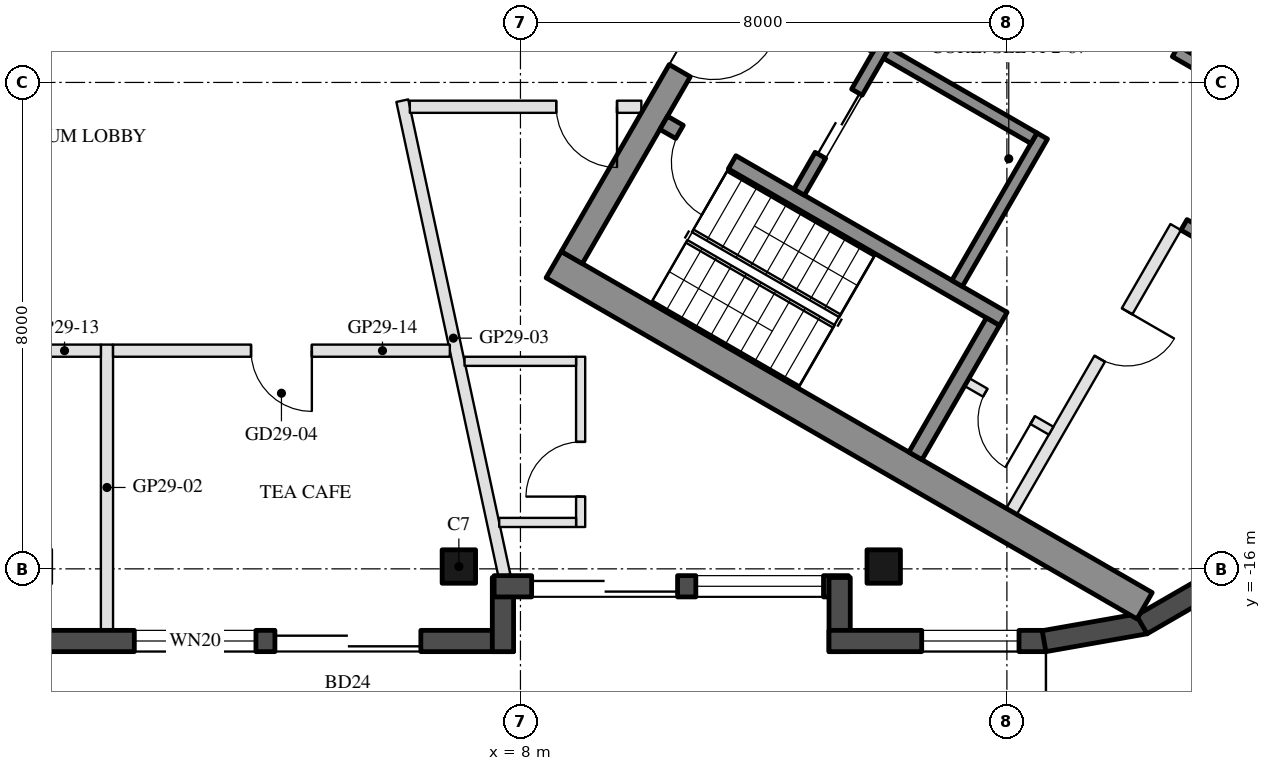
"""IFC4 building model, lengths in metres.
Left out: names, types, materials, properties, quantities, classifications, styles, units other than length and angle.
Written with IfcOpenShell. Run it as: python <this file> out.ifc"""

import sys

from ifc_helpers import new_model, si_unit, direction, frame, frame_2d, origin, origin_2d, place, context, subcontext, project, spatial, rectangle, hollow_rectangle, extrude, boolean, halfspace, element, fill, save


model = new_model("IFC4")
c1 = context("Model", 3, precision=1e-05, world=origin(), true_north=direction((0.0, 1.0)))
c2 = subcontext(c1, "Body", "Model", "MODEL_VIEW")
j1 = project(units=[si_unit("LENGTHUNIT", "METRE"), si_unit("PLANEANGLEUNIT", "RADIAN")], contexts=[c1])
p1 = place(None, origin())
s1 = spatial("IfcSite", under=j1, at=p1, CompositionType="ELEMENT")
p2 = place(p1, origin())
s2 = spatial("IfcBuilding", under=s1, at=p2, CompositionType="ELEMENT")
p3 = place(p2, frame((0.0, 0.0, 291.1)))
s3 = spatial("IfcBuildingStorey", under=s2, at=p3, CompositionType="ELEMENT", Elevation=291.1)
p4 = place(p3, frame((6.987, -15.962, 0.0), z_axis=(0.0, 0.0, 1.0), x_axis=(-1.0, 0.0, 0.0)))
e1 = element("IfcColumn", 1, at=p4, inside=s3, PredefinedType="COLUMN", context=c2, shape_type="SweptSolid", body=[
    boolean("DIFFERENCE", extrude(hollow_rectangle(XDim=0.55, YDim=0.55, WallThickness=0.025, at=origin_2d()), origin(), (0.0, 0.0, 1.0), 3.7), halfspace(frame((0.0, 0.0, 0.034), z_axis=(0.0, 0.0, 1.0), x_axis=(1.0, 0.0, 0.0)), True)),
])
p5 = place(p3, frame((13.974, -15.962, 0.0), z_axis=(0.0, 0.0, 1.0), x_axis=(-1.0, 0.0, 0.0)))
e2 = element("IfcColumn", 2, at=p5, inside=s3, PredefinedType="COLUMN", context=c2, shape_type="SweptSolid", body=[
    boolean("DIFFERENCE", extrude(hollow_rectangle(XDim=0.55, YDim=0.55, WallThickness=0.025, at=origin_2d()), origin(), (0.0, 0.0, 1.0), 3.7), halfspace(frame((0.0, 0.0, 0.04), z_axis=(0.0, 0.0, 1.0), x_axis=(1.0, 0.0, 0.0)), True)),
])
p6 = place(p3, frame((-0.9, -17.187, 0.0), z_axis=(0.0, 0.0, 1.0), x_axis=(1.0, 0.0, 0.0)))
e3 = element("IfcWall", 3, at=p6, inside=s3, PredefinedType="SOLIDWALL", context=c2, shape_type="SweptSolid", body=[
    extrude(rectangle(XDim=8.787, YDim=0.35, at=frame_2d((4.394, 0.0))), origin(), (0.0, 0.0, 1.0), 3.55),
])
p7 = place(p6, frame((4.862, 0.0, 0.0)))
e4 = element("IfcOpeningElement", 4, at=p7, cuts=e3, PredefinedType="OPENING", context=c2, shape_type="SweptSolid", body=[
    extrude(rectangle(XDim=2.4, YDim=2.4, at=frame_2d((1.2, 1.2))), frame((0.0, 0.185, 0.0), z_axis=(0.0, -1.0, 0.0), x_axis=(1.0, 0.0, 0.0)), (0.0, 0.0, 1.0), 0.37),
])
p8 = place(p6, frame((2.55, 0.0, 0.3)))
e5 = element("IfcOpeningElement", 5, at=p8, cuts=e3, PredefinedType="OPENING", context=c2, shape_type="SweptSolid", body=[
    extrude(rectangle(XDim=2.0, YDim=2.65, at=frame_2d((1.0, 1.325))), frame((0.0, 0.185, 0.0), z_axis=(0.0, -1.0, 0.0), x_axis=(1.0, 0.0, 0.0)), (0.0, 0.0, 1.0), 0.37),
])
p9 = place(p3, frame((7.712, -17.362, 0.0), z_axis=(0.0, 0.0, 1.0), x_axis=(0.0, 1.0, 0.0)))
e6 = element("IfcWall", 6, at=p9, inside=s3, PredefinedType="SOLIDWALL", context=c2, shape_type="SweptSolid", body=[
    extrude(rectangle(XDim=1.22, YDim=0.35, at=frame_2d((0.61, 0.0))), origin(), (0.0, 0.0, 1.0), 3.55),
])
p10 = place(p3, frame((7.567, -16.287, 0.0), z_axis=(0.0, 0.0, 1.0), x_axis=(1.0, 0.0, 0.0)))
e7 = element("IfcWall", 7, at=p10, inside=s3, PredefinedType="SOLIDWALL", context=c2, shape_type="SweptSolid", body=[
    extrude(rectangle(XDim=5.827, YDim=0.35, at=frame_2d((2.914, 0.0))), origin(), (0.0, 0.0, 1.0), 3.55),
])
p11 = place(p10, frame((0.617, 0.0, 0.0)))
e8 = element("IfcOpeningElement", 8, at=p11, cuts=e7, PredefinedType="OPENING", context=c2, shape_type="SweptSolid", body=[
    extrude(rectangle(XDim=2.4, YDim=2.4, at=frame_2d((1.2, 1.2))), frame((0.0, 0.185, 0.0), z_axis=(0.0, -1.0, 0.0), x_axis=(1.0, 0.0, 0.0)), (0.0, 0.0, 1.0), 0.37),
])
p12 = place(p10, frame((3.317, 0.0, 0.3)))
e9 = element("IfcOpeningElement", 9, at=p12, cuts=e7, PredefinedType="OPENING", context=c2, shape_type="SweptSolid", body=[
    extrude(rectangle(XDim=2.1, YDim=2.65, at=frame_2d((1.05, 1.325))), frame((0.0, 0.185, 0.0), z_axis=(0.0, -1.0, 0.0), x_axis=(1.0, 0.0, 0.0)), (0.0, 0.0, 1.0), 0.37),
])
p13 = place(p3, frame((13.249, -16.142, 0.0), z_axis=(0.0, 0.0, 1.0), x_axis=(0.0, -1.0, 0.0)))
e10 = element("IfcWall", 10, at=p13, inside=s3, PredefinedType="SOLIDWALL", context=c2, shape_type="SweptSolid", body=[
    extrude(rectangle(XDim=1.22, YDim=0.35, at=frame_2d((0.61, 0.0))), origin(), (0.0, 0.0, 1.0), 3.55),
])
p14 = place(p3, frame((13.074, -17.187, 0.0), z_axis=(0.0, 0.0, 1.0), x_axis=(1.0, 0.0, 0.0)))
e11 = element("IfcWall", 11, at=p14, inside=s3, PredefinedType="SOLIDWALL", context=c2, shape_type="SweptSolid", body=[
    extrude(rectangle(XDim=3.567, YDim=0.35, at=frame_2d((1.784, 0.0))), origin(), (0.0, 0.0, 1.0), 3.55),
])
p15 = place(p14, frame((1.525, 0.0, 0.3)))
e12 = element("IfcOpeningElement", 12, at=p15, cuts=e11, PredefinedType="OPENING", context=c2, shape_type="SweptSolid", body=[
    extrude(rectangle(XDim=1.6, YDim=2.65, at=frame_2d((0.8, 1.325))), frame((0.0, 0.185, 0.0), z_axis=(0.0, -1.0, 0.0), x_axis=(1.0, 0.0, 0.0)), (0.0, 0.0, 1.0), 0.37),
])
for number, where, z_axis, x_axis in (
    (13, (16.611, -17.189, 0.0), (0.0, 0.0, 1.0), (0.985, 0.174, 0.0)),
    (14, (18.218, -16.917, 0.0), (0.0, 0.0, 1.0), (0.866, 0.5, 0.0)),
):
    element("IfcWall", number, at=place(p3, frame(where, z_axis=z_axis, x_axis=x_axis)), inside=s3, PredefinedType="SOLIDWALL", context=c2, shape_type="SweptSolid", body=[
        extrude(rectangle(XDim=1.689, YDim=0.35, at=frame_2d((0.845, 0.0))), origin(), (0.0, 0.0, 1.0), 3.55),
    ])
for number, where, z_axis, x_axis in (
    (15, (8.547, -10.997, 0.0), (0.0, 0.0, 1.0), (0.866, -0.5, 0.0)),
    (16, (13.797, -1.903, 0.0), (0.0, 0.0, 1.0), (0.866, -0.5, 0.0)),
):
    element("IfcWall", number, at=place(p3, frame(where, z_axis=z_axis, x_axis=x_axis)), inside=s3, PredefinedType="SHEAR", context=c2, shape_type="SweptSolid", body=[
        extrude(rectangle(XDim=11.222, YDim=0.5, at=frame_2d((5.611, 0.0))), origin(), (0.0, 0.0, 1.0), 3.5),
    ])
p16 = place(p3, frame((8.845, -10.88, 0.0), z_axis=(0.0, 0.0, 1.0), x_axis=(0.500004234368, 0.866022959057, 0.0)))
e17 = element("IfcWall", 17, at=p16, inside=s3, PredefinedType="SHEAR", context=c2, shape_type="SweptSolid", body=[
    extrude(rectangle(XDim=10.0, YDim=0.4, at=frame_2d((5.0, 0.0))), origin(), (0.0, 0.0, 1.0), 3.5),
])
p17 = place(p16, frame((3.55, 0.0, 0.0)))
e18 = element("IfcOpeningElement", 18, at=p17, cuts=e17, PredefinedType="OPENING", context=c2, shape_type="SweptSolid", body=[
    extrude(rectangle(XDim=1.1, YDim=2.1, at=frame_2d((0.55, 1.05))), frame((0.0, 0.21, 0.0), z_axis=(0.0, -1.0, 0.0), x_axis=(1.0, 0.0, 0.0)), (0.0, 0.0, 1.0), 0.42),
])
p18 = place(p16, frame((5.85, 0.0, 0.0)))
e19 = element("IfcOpeningElement", 19, at=p18, cuts=e17, PredefinedType="OPENING", context=c2, shape_type="SweptSolid", body=[
    extrude(rectangle(XDim=1.4, YDim=2.1, at=frame_2d((0.7, 1.05))), frame((0.0, 0.21, 0.0), z_axis=(0.0, -1.0, 0.0), x_axis=(1.0, 0.0, 0.0)), (0.0, 0.0, 1.0), 0.42),
])
p19 = place(p3, frame((10.356, -8.664, 0.0), z_axis=(0.0, 0.0, 1.0), x_axis=(0.866028629588, -0.499994412703, 0.0)))
e20 = element("IfcWall", 20, at=p19, inside=s3, PredefinedType="SHEAR", context=c2, shape_type="SweptSolid", body=[
    extrude(rectangle(XDim=6.45, YDim=0.25, at=frame_2d((3.225, 0.0))), origin(), (0.0, 0.0, 1.0), 3.5),
])
p20 = place(p19, frame((0.3, 0.0, 0.0)))
e21 = element("IfcOpeningElement", 21, at=p20, cuts=e20, PredefinedType="OPENING", context=c2, shape_type="SweptSolid", body=[
    extrude(rectangle(XDim=1.0, YDim=2.1, at=frame_2d((0.5, 1.05))), frame((0.0, 0.135, 0.0), z_axis=(0.0, -1.0, 0.0), x_axis=(1.0, 0.0, 0.0)), (0.0, 0.0, 1.0), 0.27),
])
p21 = place(p3, frame((14.496, -14.143, 0.0), z_axis=(0.0, 0.0, 1.0), x_axis=(0.500062241894, 0.865989465428, 0.0)))
e22 = element("IfcWall", 22, at=p21, inside=s3, PredefinedType="SHEAR", context=c2, shape_type="SweptSolid", body=[
    extrude(rectangle(XDim=2.55, YDim=0.25, at=frame_2d((1.275, 0.0))), origin(), (0.0, 0.0, 1.0), 3.5),
])
p22 = place(p3, frame((15.181, -11.305, 0.0), z_axis=(0.0, 0.0, 1.0), x_axis=(0.49994636267, 0.866056369097, 0.0)))
e23 = element("IfcWall", 23, at=p22, inside=s3, PredefinedType="SHEAR", context=c2, shape_type="SweptSolid", body=[
    extrude(rectangle(XDim=2.8, YDim=0.2, at=frame_2d((1.4, 0.0))), origin(), (0.0, 0.0, 1.0), 3.5),
])
p23 = place(p3, frame((12.583, -9.805, 0.0), z_axis=(0.0, 0.0, 1.0), x_axis=(0.49994636267, 0.866056369097, 0.0)))
e24 = element("IfcWall", 24, at=p23, inside=s3, PredefinedType="SHEAR", context=c2, shape_type="SweptSolid", body=[
    extrude(rectangle(XDim=2.8, YDim=0.2, at=frame_2d((1.4, 0.0))), origin(), (0.0, 0.0, 1.0), 3.5),
])
p24 = place(p23, frame((0.7, 0.0, 0.0)))
e25 = element("IfcOpeningElement", 25, at=p24, cuts=e24, PredefinedType="OPENING", context=c2, shape_type="SweptSolid", body=[
    extrude(rectangle(XDim=1.2, YDim=2.1, at=frame_2d((0.6, 1.05))), frame((0.0, 0.11, 0.0), z_axis=(0.0, -1.0, 0.0), x_axis=(1.0, 0.0, 0.0)), (0.0, 0.0, 1.0), 0.22),
])
p25 = place(p3, frame((11.768, -6.217, 0.0), z_axis=(0.0, 0.0, 1.0), x_axis=(0.866050077142, -0.499957262057, 0.0)))
e26 = element("IfcWall", 26, at=p25, inside=s3, PredefinedType="SHEAR", context=c2, shape_type="SweptSolid", body=[
    extrude(rectangle(XDim=2.4, YDim=0.2, at=frame_2d((1.2, 0.0))), origin(), (0.0, 0.0, 1.0), 3.5),
])
p26 = place(p3, frame((14.02, -7.517, 0.0), z_axis=(0.0, 0.0, 1.0), x_axis=(0.866034573852, -0.49998411664, 0.0)))
e27 = element("IfcWall", 27, at=p26, inside=s3, PredefinedType="SHEAR", context=c2, shape_type="SweptSolid", body=[
    extrude(rectangle(XDim=2.8, YDim=0.2, at=frame_2d((1.4, 0.0))), origin(), (0.0, 0.0, 1.0), 3.5),
])
p27 = place(p3, frame((12.968, -4.138, 0.0), z_axis=(0.0, 0.0, 1.0), x_axis=(0.866028328073, -0.49999493495, 0.0)))
e28 = element("IfcWall", 28, at=p27, inside=s3, PredefinedType="SHEAR", context=c2, shape_type="SweptSolid", body=[
    extrude(rectangle(XDim=10.16, YDim=0.2, at=frame_2d((5.08, 0.0))), origin(), (0.0, 0.0, 1.0), 3.5),
])
p28 = place(p27, frame((0.62, 0.0, 0.0)))
e29 = element("IfcOpeningElement", 29, at=p28, cuts=e28, PredefinedType="OPENING", context=c2, shape_type="SweptSolid", body=[
    extrude(rectangle(XDim=1.1, YDim=2.1, at=frame_2d((0.55, 1.05))), frame((0.0, 0.11, 0.0), z_axis=(0.0, -1.0, 0.0), x_axis=(1.0, 0.0, 0.0)), (0.0, 0.0, 1.0), 0.22),
])
p29 = place(p27, frame((5.8, 0.0, 0.0)))
e30 = element("IfcOpeningElement", 30, at=p29, cuts=e28, PredefinedType="OPENING", context=c2, shape_type="SweptSolid", body=[
    extrude(rectangle(XDim=0.9, YDim=2.1, at=frame_2d((0.45, 1.05))), frame((0.0, 0.11, 0.0), z_axis=(0.0, -1.0, 0.0), x_axis=(1.0, 0.0, 0.0)), (0.0, 0.0, 1.0), 0.22),
])
p30 = place(p3, frame((18.913, -10.342, 0.0), z_axis=(0.0, 0.0, 1.0), x_axis=(0.866053003207, -0.499952193351, 0.0)))
e31 = element("IfcWall", 31, at=p30, inside=s3, PredefinedType="SHEAR", context=c2, shape_type="SweptSolid", body=[
    extrude(rectangle(XDim=1.625, YDim=0.2, at=frame_2d((0.812, 0.0))), origin(), (0.0, 0.0, 1.0), 3.5),
])
p31 = place(p3, frame((16.076, -15.055, 0.0), z_axis=(0.0, 0.0, 1.0), x_axis=(0.499995103361, 0.866028230842, 0.0)))
e32 = element("IfcWall", 32, at=p31, inside=s3, PredefinedType="PARTITIONING", context=c2, shape_type="SweptSolid", body=[
    extrude(rectangle(XDim=5.4, YDim=0.2, at=frame_2d((2.7, 0.0))), origin(), (0.0, 0.0, 1.0), 3.5),
])
p32 = place(p31, frame((2.9, 0.0, 0.0)))
e33 = element("IfcOpeningElement", 33, at=p32, cuts=e32, PredefinedType="OPENING", context=c2, shape_type="SweptSolid", body=[
    extrude(rectangle(XDim=0.9, YDim=2.1, at=frame_2d((0.45, 1.05))), frame((0.0, 0.11, 0.0), z_axis=(0.0, -1.0, 0.0), x_axis=(1.0, 0.0, 0.0)), (0.0, 0.0, 1.0), 0.22),
])
p33 = place(p3, frame((15.342, -12.928, 0.0), z_axis=(0.0, 0.0, 1.0), x_axis=(0.865989903783, -0.500061482766, 0.0)))
e34 = element("IfcWall", 34, at=p33, inside=s3, PredefinedType="PARTITIONING", context=c2, shape_type="SweptSolid", body=[
    extrude(rectangle(XDim=1.6, YDim=0.15, at=frame_2d((0.8, 0.0))), origin(), (0.0, 0.0, 1.0), 3.5),
])
p34 = place(p33, frame((0.35, 0.0, 0.0)))
e35 = element("IfcOpeningElement", 35, at=p34, cuts=e34, PredefinedType="OPENING", context=c2, shape_type="SweptSolid", body=[
    extrude(rectangle(XDim=0.9, YDim=2.1, at=frame_2d((0.45, 1.05))), frame((0.0, 0.085, 0.0), z_axis=(0.0, -1.0, 0.0), x_axis=(1.0, 0.0, 0.0)), (0.0, 0.0, 1.0), 0.17),
])
p35 = place(p3, frame((1.2, -17.012, 0.0), z_axis=(0.0, 0.0, 1.0), x_axis=(0.0, 1.0, 0.0)))
e36 = element("IfcWall", 36, at=p35, inside=s3, PredefinedType="PARTITIONING", context=c2, shape_type="SweptSolid", body=[
    extrude(rectangle(XDim=4.7, YDim=0.2, at=frame_2d((2.35, 0.0))), origin(), (0.0, 0.0, 1.0), 3.16),
])
p36 = place(p3, frame((7.737, -16.112, 0.0), z_axis=(0.0, 0.0, 1.0), x_axis=(-0.210221826162, 0.977653713646, 0.0)))
e37 = element("IfcWall", 37, at=p36, inside=s3, PredefinedType="PARTITIONING", context=c2, shape_type="SweptSolid", body=[
    extrude(rectangle(XDim=7.99, YDim=0.2, at=frame_2d((3.995, 0.0))), origin(), (0.0, 0.0, 1.0), 3.05),
])
p37 = place(p3, frame((1.1, -12.412, 0.0), z_axis=(0.0, 0.0, 1.0), x_axis=(-1.0, 0.0, 0.0)))
e38 = element("IfcWall", 38, at=p37, inside=s3, PredefinedType="PARTITIONING", context=c2, shape_type="SweptSolid", body=[
    extrude(rectangle(XDim=4.982, YDim=0.2, at=frame_2d((2.491, 0.0))), origin(), (0.0, 0.0, 1.0), 3.05),
])
p38 = place(p37, frame((1.991, 0.0, 0.0)))
e39 = element("IfcOpeningElement", 39, at=p38, cuts=e38, PredefinedType="OPENING", context=c2, shape_type="SweptSolid", body=[
    extrude(rectangle(XDim=1.0, YDim=2.1, at=frame_2d((0.5, 1.05))), frame((0.0, 0.11, 0.0), z_axis=(0.0, -1.0, 0.0), x_axis=(1.0, 0.0, 0.0)), (0.0, 0.0, 1.0), 0.22),
])
p39 = place(p3, frame((6.839, -12.412, 0.0), z_axis=(0.0, 0.0, 1.0), x_axis=(-1.0, 0.0, 0.0)))
e40 = element("IfcWall", 40, at=p39, inside=s3, PredefinedType="PARTITIONING", context=c2, shape_type="SweptSolid", body=[
    extrude(rectangle(XDim=5.539, YDim=0.2, at=frame_2d((2.769, 0.0))), origin(), (0.0, 0.0, 1.0), 3.05),
])
p40 = place(p39, frame((2.269, 0.0, 0.0)))
e41 = element("IfcOpeningElement", 41, at=p40, cuts=e40, PredefinedType="OPENING", context=c2, shape_type="SweptSolid", body=[
    extrude(rectangle(XDim=1.0, YDim=2.1, at=frame_2d((0.5, 1.05))), frame((0.0, 0.11, 0.0), z_axis=(0.0, -1.0, 0.0), x_axis=(1.0, 0.0, 0.0)), (0.0, 0.0, 1.0), 0.22),
])
p41 = place(p3, frame((9.988, -8.4, 0.0), z_axis=(0.0, 0.0, 1.0), x_axis=(-1.0, 0.0, 0.0)))
e42 = element("IfcWall", 42, at=p41, inside=s3, PredefinedType="PARTITIONING", context=c2, shape_type="SweptSolid", body=[
    extrude(rectangle(XDim=3.807, YDim=0.2, at=frame_2d((1.904, 0.0))), origin(), (0.0, 0.0, 1.0), 3.05),
])
p42 = place(p41, frame((0.4, 0.0, 0.0)))
e43 = element("IfcOpeningElement", 43, at=p42, cuts=e42, PredefinedType="OPENING", context=c2, shape_type="SweptSolid", body=[
    extrude(rectangle(XDim=1.0, YDim=2.1, at=frame_2d((0.5, 1.05))), frame((0.0, 0.11, 0.0), z_axis=(0.0, -1.0, 0.0), x_axis=(1.0, 0.0, 0.0)), (0.0, 0.0, 1.0), 0.22),
])
p43 = place(p3, frame((8.99, -15.312, 0.0), z_axis=(0.0, 0.0, 1.0), x_axis=(0.0, 1.0, 0.0)))
e44 = element("IfcWall", 44, at=p43, inside=s3, PredefinedType="PARTITIONING", context=c2, shape_type="SweptSolid", body=[
    extrude(rectangle(XDim=2.8, YDim=0.15, at=frame_2d((1.4, 0.0))), origin(), (0.0, 0.0, 1.0), 3.55),
])
p44 = place(p43, frame((0.5, 0.0, 0.0)))
e45 = element("IfcOpeningElement", 45, at=p44, cuts=e44, PredefinedType="OPENING", context=c2, shape_type="SweptSolid", body=[
    extrude(rectangle(XDim=0.9, YDim=2.1, at=frame_2d((0.45, 1.05))), frame((0.0, 0.085, 0.0), z_axis=(0.0, -1.0, 0.0), x_axis=(1.0, 0.0, 0.0)), (0.0, 0.0, 1.0), 0.17),
])
p45 = place(p3, frame((7.651, -15.237, 0.0), z_axis=(0.0, 0.0, 1.0), x_axis=(1.0, 0.0, 0.0)))
e46 = element("IfcWall", 46, at=p45, inside=s3, PredefinedType="PARTITIONING", context=c2, shape_type="SweptSolid", body=[
    extrude(rectangle(XDim=1.264, YDim=0.15, at=frame_2d((0.632, 0.0))), origin(), (0.0, 0.0, 1.0), 3.55),
])
p46 = place(p3, frame((7.081, -12.587, 0.0), z_axis=(0.0, 0.0, 1.0), x_axis=(1.0, 0.0, 0.0)))
e47 = element("IfcWall", 47, at=p46, inside=s3, PredefinedType="PARTITIONING", context=c2, shape_type="SweptSolid", body=[
    extrude(rectangle(XDim=1.834, YDim=0.15, at=frame_2d((0.917, 0.0))), origin(), (0.0, 0.0, 1.0), 3.05),
])
p47 = place(p7, frame((2.4, 0.0, 0.0), z_axis=(0.0, 0.0, 1.0), x_axis=(-1.0, 0.0, 0.0)))
e48 = element("IfcDoor", 48, at=p47, inside=s3, OperationType="SLIDING_TO_LEFT", PredefinedType="DOOR", context=c2, shape_type="SweptSolid", body=[
    extrude(rectangle(XDim=2.4, YDim=2.4, at=frame_2d((1.2, 1.2))), frame((0.0, 0.025, 0.0), z_axis=(0.0, -1.0, 0.0), x_axis=(1.0, 0.0, 0.0)), (0.0, 0.0, 1.0), 0.05),
])
fill(e4, e48)
p48 = place(p8, origin())
e49 = element("IfcWindow", 49, at=p48, inside=s3, PartitioningType="SINGLE_PANEL", PredefinedType="WINDOW", context=c2, shape_type="SweptSolid", body=[
    extrude(rectangle(XDim=2.0, YDim=2.65, at=frame_2d((1.0, 1.325))), frame((0.0, 0.03, 0.0), z_axis=(0.0, -1.0, 0.0), x_axis=(1.0, 0.0, 0.0)), (0.0, 0.0, 1.0), 0.06),
])
fill(e5, e49)
p49 = place(p11, frame((2.4, 0.0, 0.0), z_axis=(0.0, 0.0, 1.0), x_axis=(-1.0, 0.0, 0.0)))
e50 = element("IfcDoor", 50, at=p49, inside=s3, OperationType="SLIDING_TO_LEFT", PredefinedType="DOOR", context=c2, shape_type="SweptSolid", body=[
    extrude(rectangle(XDim=2.4, YDim=2.4, at=frame_2d((1.2, 1.2))), frame((0.0, 0.025, 0.0), z_axis=(0.0, -1.0, 0.0), x_axis=(1.0, 0.0, 0.0)), (0.0, 0.0, 1.0), 0.05),
])
fill(e8, e50)
p50 = place(p12, origin())
e51 = element("IfcWindow", 51, at=p50, inside=s3, PartitioningType="SINGLE_PANEL", PredefinedType="WINDOW", context=c2, shape_type="SweptSolid", body=[
    extrude(rectangle(XDim=2.1, YDim=2.65, at=frame_2d((1.05, 1.325))), frame((0.0, 0.03, 0.0), z_axis=(0.0, -1.0, 0.0), x_axis=(1.0, 0.0, 0.0)), (0.0, 0.0, 1.0), 0.06),
])
fill(e9, e51)
p51 = place(p15, origin())
e52 = element("IfcWindow", 52, at=p51, inside=s3, PartitioningType="SINGLE_PANEL", PredefinedType="WINDOW", context=c2, shape_type="SweptSolid", body=[
    extrude(rectangle(XDim=1.6, YDim=2.65, at=frame_2d((0.8, 1.325))), frame((0.0, 0.03, 0.0), z_axis=(0.0, -1.0, 0.0), x_axis=(1.0, 0.0, 0.0)), (0.0, 0.0, 1.0), 0.06),
])
fill(e12, e52)
p52 = place(p24, origin())
e53 = element("IfcDoor", 53, at=p52, inside=s3, OperationType="DOUBLE_DOOR_SLIDING", PredefinedType="DOOR", context=c2, shape_type="SweptSolid", body=[
    extrude(rectangle(XDim=1.2, YDim=2.1, at=frame_2d((0.6, 1.05))), frame((0.0, 0.025, 0.0), z_axis=(0.0, -1.0, 0.0), x_axis=(1.0, 0.0, 0.0)), (0.0, 0.0, 1.0), 0.05),
])
fill(e25, e53)
p53 = place(p34, frame((0.9, 0.0, 0.0), z_axis=(0.0, 0.0, 1.0), x_axis=(-1.0, 0.0, 0.0)))
e54 = element("IfcDoor", 54, at=p53, inside=s3, OperationType="SINGLE_SWING_LEFT", PredefinedType="DOOR", context=c2, shape_type="SweptSolid", body=[
    extrude(rectangle(XDim=0.9, YDim=2.1, at=frame_2d((0.45, 1.05))), frame((0.0, 0.025, 0.0), z_axis=(0.0, -1.0, 0.0), x_axis=(1.0, 0.0, 0.0)), (0.0, 0.0, 1.0), 0.05),
])
fill(e35, e54)
p54 = place(p29, origin())
e55 = element("IfcDoor", 55, at=p54, inside=s3, OperationType="SINGLE_SWING_LEFT", PredefinedType="DOOR", context=c2, shape_type="SweptSolid", body=[
    extrude(rectangle(XDim=0.9, YDim=2.1, at=frame_2d((0.45, 1.05))), frame((0.0, 0.025, 0.0), z_axis=(0.0, -1.0, 0.0), x_axis=(1.0, 0.0, 0.0)), (0.0, 0.0, 1.0), 0.05),
])
fill(e30, e55)
p55 = place(p32, frame((0.9, 0.0, 0.0), z_axis=(0.0, 0.0, 1.0), x_axis=(-1.0, 0.0, 0.0)))
e56 = element("IfcDoor", 56, at=p55, inside=s3, OperationType="SINGLE_SWING_LEFT", PredefinedType="DOOR", context=c2, shape_type="SweptSolid", body=[
    extrude(rectangle(XDim=0.9, YDim=2.1, at=frame_2d((0.45, 1.05))), frame((0.0, 0.025, 0.0), z_axis=(0.0, -1.0, 0.0), x_axis=(1.0, 0.0, 0.0)), (0.0, 0.0, 1.0), 0.05),
])
fill(e33, e56)
p56 = place(p17, frame((1.1, 0.0, 0.0), z_axis=(0.0, 0.0, 1.0), x_axis=(-1.0, 0.0, 0.0)))
e57 = element("IfcDoor", 57, at=p56, inside=s3, OperationType="SINGLE_SWING_LEFT", PredefinedType="DOOR", context=c2, shape_type="SweptSolid", body=[
    extrude(rectangle(XDim=1.1, YDim=2.1, at=frame_2d((0.55, 1.05))), frame((0.0, 0.025, 0.0), z_axis=(0.0, -1.0, 0.0), x_axis=(1.0, 0.0, 0.0)), (0.0, 0.0, 1.0), 0.05),
])
fill(e18, e57)
p57 = place(p20, frame((1.0, 0.0, 0.0), z_axis=(0.0, 0.0, 1.0), x_axis=(-1.0, 0.0, 0.0)))
e58 = element("IfcDoor", 58, at=p57, inside=s3, OperationType="SINGLE_SWING_LEFT", PredefinedType="DOOR", context=c2, shape_type="SweptSolid", body=[
    extrude(rectangle(XDim=1.0, YDim=2.1, at=frame_2d((0.5, 1.05))), frame((0.0, 0.025, 0.0), z_axis=(0.0, -1.0, 0.0), x_axis=(1.0, 0.0, 0.0)), (0.0, 0.0, 1.0), 0.05),
])
fill(e21, e58)
p58 = place(p40, origin())
e59 = element("IfcDoor", 59, at=p58, inside=s3, OperationType="SINGLE_SWING_LEFT", PredefinedType="DOOR", context=c2, shape_type="SweptSolid", body=[
    extrude(rectangle(XDim=1.0, YDim=2.1, at=frame_2d((0.5, 1.05))), frame((0.0, 0.025, 0.0), z_axis=(0.0, -1.0, 0.0), x_axis=(1.0, 0.0, 0.0)), (0.0, 0.0, 1.0), 0.05),
])
fill(e41, e59)
p59 = place(p44, origin())
e60 = element("IfcDoor", 60, at=p59, inside=s3, OperationType="SINGLE_SWING_LEFT", PredefinedType="DOOR", context=c2, shape_type="SweptSolid", body=[
    extrude(rectangle(XDim=0.9, YDim=2.1, at=frame_2d((0.45, 1.05))), frame((0.0, 0.025, 0.0), z_axis=(0.0, -1.0, 0.0), x_axis=(1.0, 0.0, 0.0)), (0.0, 0.0, 1.0), 0.05),
])
fill(e45, e60)
p60 = place(p42, origin())
e61 = element("IfcDoor", 61, at=p60, inside=s3, OperationType="SINGLE_SWING_LEFT", PredefinedType="DOOR", context=c2, shape_type="SweptSolid", body=[
    extrude(rectangle(XDim=1.0, YDim=2.1, at=frame_2d((0.5, 1.05))), frame((0.0, 0.025, 0.0), z_axis=(0.0, -1.0, 0.0), x_axis=(1.0, 0.0, 0.0)), (0.0, 0.0, 1.0), 0.05),
])
fill(e43, e61)
save(model, sys.argv[1])
